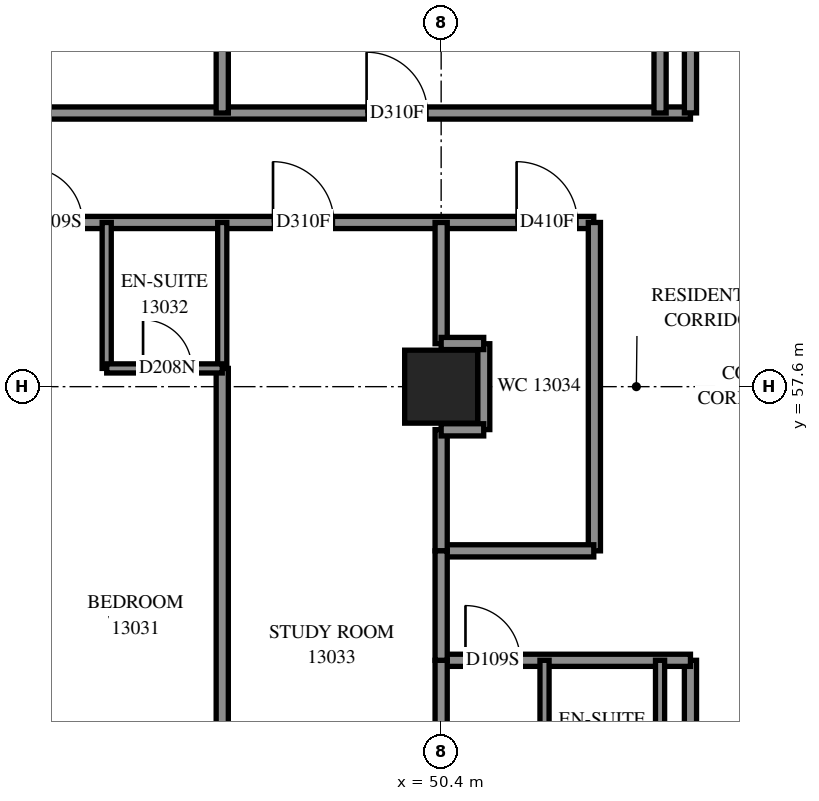
"""IFC4 building model, lengths in metres.
Left out: names, types, materials, properties, quantities, classifications, styles, units other than length and angle.
Written with IfcOpenShell. Run it as: python <this file> out.ifc"""

import sys

from ifc_helpers import new_model, si_unit, direction, frame, frame_2d, origin, origin_2d, place, context, subcontext, project, spatial, rectangle, extrude, element, fill, save


model = new_model("IFC4")
c1 = context("Model", 3, precision=1e-05, world=origin(), true_north=direction((0.0, 1.0)))
c2 = subcontext(c1, "Body", "Model", "MODEL_VIEW")
j1 = project(units=[si_unit("LENGTHUNIT", "METRE"), si_unit("PLANEANGLEUNIT", "RADIAN")], contexts=[c1])
p1 = place(None, origin())
s1 = spatial("IfcSite", under=j1, at=p1, CompositionType="ELEMENT")
p2 = place(p1, origin())
s2 = spatial("IfcBuilding", under=s1, at=p2, CompositionType="ELEMENT")
p3 = place(p2, frame((0.0, 0.0, 50.8)))
s3 = spatial("IfcBuildingStorey", under=s2, at=p3, CompositionType="ELEMENT", Elevation=50.8)
p4 = place(p3, frame((50.4, 57.6, 0.0), z_axis=(0.0, 0.0, 1.0), x_axis=(1.0, 0.0, 0.0)))
e1 = element("IfcColumn", 1, at=p4, inside=s3, PredefinedType="COLUMN", context=c2, shape_type="SweptSolid", body=[
    extrude(rectangle(XDim=1.2, YDim=1.2, at=origin_2d()), origin(), (0.0, 0.0, 1.0), 3.1),
])
p5 = place(p3, frame((28.802, 60.3, 0.0), z_axis=(0.0, 0.0, 1.0), x_axis=(1.0, 0.0, 0.0)))
e2 = element("IfcWall", 2, at=p5, inside=s3, PredefinedType="PARTITIONING", context=c2, shape_type="SweptSolid", body=[
    extrude(rectangle(XDim=24.108, YDim=0.2, at=frame_2d((12.054, 0.0))), origin(), (0.0, 0.0, 1.0), 3.1),
])
p6 = place(p5, frame((11.323, 0.0, 0.0)))
e3 = element("IfcOpeningElement", 3, at=p6, cuts=e2, PredefinedType="OPENING", context=c2, shape_type="SweptSolid", body=[
    extrude(rectangle(XDim=1.0, YDim=2.1, at=frame_2d((0.5, 1.05))), frame((0.0, 0.11, 0.0), z_axis=(0.0, -1.0, 0.0), x_axis=(1.0, 0.0, 0.0)), (0.0, 0.0, 1.0), 0.22),
])
p7 = place(p5, frame((14.798, 0.0, 0.0)))
e4 = element("IfcOpeningElement", 4, at=p7, cuts=e2, PredefinedType="OPENING", context=c2, shape_type="SweptSolid", body=[
    extrude(rectangle(XDim=0.9, YDim=2.1, at=frame_2d((0.45, 1.05))), frame((0.0, 0.11, 0.0), z_axis=(0.0, -1.0, 0.0), x_axis=(1.0, 0.0, 0.0)), (0.0, 0.0, 1.0), 0.22),
])
p8 = place(p5, frame((18.833, 0.0, 0.0)))
e5 = element("IfcOpeningElement", 5, at=p8, cuts=e2, PredefinedType="OPENING", context=c2, shape_type="SweptSolid", body=[
    extrude(rectangle(XDim=1.0, YDim=2.1, at=frame_2d((0.5, 1.05))), frame((0.0, 0.11, 0.0), z_axis=(0.0, -1.0, 0.0), x_axis=(1.0, 0.0, 0.0)), (0.0, 0.0, 1.0), 0.22),
])
p9 = place(p5, frame((22.839, 0.0, 0.0)))
e6 = element("IfcOpeningElement", 6, at=p9, cuts=e2, PredefinedType="OPENING", context=c2, shape_type="SweptSolid", body=[
    extrude(rectangle(XDim=1.0, YDim=2.1, at=frame_2d((0.5, 1.05))), frame((0.0, 0.11, 0.0), z_axis=(0.0, -1.0, 0.0), x_axis=(1.0, 0.0, 0.0)), (0.0, 0.0, 1.0), 0.22),
])
p10 = place(p3, frame((33.3, 62.1, 0.0), z_axis=(0.0, 0.0, 1.0), x_axis=(1.0, 0.0, 0.0)))
e7 = element("IfcWall", 7, at=p10, inside=s3, PredefinedType="PARTITIONING", context=c2, shape_type="SweptSolid", body=[
    extrude(rectangle(XDim=21.2, YDim=0.2, at=frame_2d((10.6, 0.0))), origin(), (0.0, 0.0, 1.0), 3.1),
])
p11 = place(p10, frame((1.395, 0.0, 0.0)))
e8 = element("IfcOpeningElement", 8, at=p11, cuts=e7, PredefinedType="OPENING", context=c2, shape_type="SweptSolid", body=[
    extrude(rectangle(XDim=0.9, YDim=2.1, at=frame_2d((0.45, 1.05))), frame((0.0, 0.11, 0.0), z_axis=(0.0, -1.0, 0.0), x_axis=(1.0, 0.0, 0.0)), (0.0, 0.0, 1.0), 0.22),
])
p12 = place(p10, frame((8.674, 0.0, 0.0)))
e9 = element("IfcOpeningElement", 9, at=p12, cuts=e7, PredefinedType="OPENING", context=c2, shape_type="SweptSolid", body=[
    extrude(rectangle(XDim=1.0, YDim=2.1, at=frame_2d((0.5, 1.05))), frame((0.0, 0.11, 0.0), z_axis=(0.0, -1.0, 0.0), x_axis=(1.0, 0.0, 0.0)), (0.0, 0.0, 1.0), 0.22),
])
p13 = place(p10, frame((15.874, 0.0, 0.0)))
e10 = element("IfcOpeningElement", 10, at=p13, cuts=e7, PredefinedType="OPENING", context=c2, shape_type="SweptSolid", body=[
    extrude(rectangle(XDim=1.0, YDim=2.1, at=frame_2d((0.5, 1.05))), frame((0.0, 0.11, 0.0), z_axis=(0.0, -1.0, 0.0), x_axis=(1.0, 0.0, 0.0)), (0.0, 0.0, 1.0), 0.22),
])
p14 = place(p3, frame((46.8, 62.1, 0.0), z_axis=(0.0, 0.0, 1.0), x_axis=(0.0, 1.0, 0.0)))
e11 = element("IfcWall", 11, at=p14, inside=s3, PredefinedType="PARTITIONING", context=c2, shape_type="SweptSolid", body=[
    extrude(rectangle(XDim=10.664, YDim=0.2, at=frame_2d((5.332, 0.0))), origin(), (0.0, 0.0, 1.0), 3.1),
])
p15 = place(p3, frame((54.0, 62.1, 0.0), z_axis=(0.0, 0.0, 1.0), x_axis=(0.0, 1.0, 0.0)))
e12 = element("IfcWall", 12, at=p15, inside=s3, PredefinedType="PARTITIONING", context=c2, shape_type="SweptSolid", body=[
    extrude(rectangle(XDim=10.609, YDim=0.2, at=frame_2d((5.304, 0.0))), origin(), (0.0, 0.0, 1.0), 3.1),
])
p16 = place(p3, frame((46.8, 49.75, 0.0), z_axis=(0.0, 0.0, 1.0), x_axis=(0.0, 1.0, 0.0)))
e13 = element("IfcWall", 13, at=p16, inside=s3, PredefinedType="PARTITIONING", context=c2, shape_type="SweptSolid", body=[
    extrude(rectangle(XDim=8.15, YDim=0.2, at=frame_2d((4.075, 0.0))), origin(), (0.0, 0.0, 1.0), 3.1),
])
p17 = place(p3, frame((54.5, 47.3, 0.0), z_axis=(0.0, 0.0, 1.0), x_axis=(0.0, 1.0, 0.0)))
e14 = element("IfcWall", 14, at=p17, inside=s3, PredefinedType="PARTITIONING", context=c2, shape_type="SweptSolid", body=[
    extrude(rectangle(XDim=5.8, YDim=0.2, at=frame_2d((2.9, 0.0))), origin(), (0.0, 0.0, 1.0), 3.1),
])
p18 = place(p3, frame((54.5, 62.102, 0.0), z_axis=(0.0, 0.0, 1.0), x_axis=(0.0, 1.0, 0.0)))
e15 = element("IfcWall", 15, at=p18, inside=s3, PredefinedType="PARTITIONING", context=c2, shape_type="SweptSolid", body=[
    extrude(rectangle(XDim=5.798, YDim=0.2, at=frame_2d((2.899, 0.0))), origin(), (0.0, 0.0, 1.0), 3.1),
])
p19 = place(p3, frame((52.92, 54.9, 0.0), z_axis=(0.0, 0.0, 1.0), x_axis=(0.0, 1.0, 0.0)))
e16 = element("IfcWall", 16, at=p19, inside=s3, PredefinedType="PARTITIONING", context=c2, shape_type="SweptSolid", body=[
    extrude(rectangle(XDim=5.4, YDim=0.2, at=frame_2d((2.7, 0.0))), origin(), (0.0, 0.0, 1.0), 3.1),
])
p20 = place(p3, frame((50.4, 53.1, 0.0), z_axis=(0.0, 0.0, 1.0), x_axis=(1.0, 0.0, 0.0)))
e17 = element("IfcWall", 17, at=p20, inside=s3, PredefinedType="PARTITIONING", context=c2, shape_type="SweptSolid", body=[
    extrude(rectangle(XDim=4.1, YDim=0.2, at=frame_2d((2.05, 0.0))), origin(), (0.0, 0.0, 1.0), 3.1),
])
p21 = place(p20, frame((0.4, 0.0, 0.0)))
e18 = element("IfcOpeningElement", 18, at=p21, cuts=e17, PredefinedType="OPENING", context=c2, shape_type="SweptSolid", body=[
    extrude(rectangle(XDim=0.9, YDim=2.1, at=frame_2d((0.45, 1.05))), frame((0.0, 0.11, 0.0), z_axis=(0.0, -1.0, 0.0), x_axis=(1.0, 0.0, 0.0)), (0.0, 0.0, 1.0), 0.22),
])
p22 = place(p3, frame((50.4, 54.9, 0.0), z_axis=(0.0, 0.0, 1.0), x_axis=(1.0, 0.0, 0.0)))
e19 = element("IfcWall", 19, at=p22, inside=s3, PredefinedType="PARTITIONING", context=c2, shape_type="SweptSolid", body=[
    extrude(rectangle(XDim=2.51, YDim=0.2, at=frame_2d((1.255, 0.0))), origin(), (0.0, 0.0, 1.0), 3.1),
])
for number, where, z_axis, x_axis in (
    (20, (44.9, 57.9, 0.0), (0.0, 0.0, 1.0), (0.0, 1.0, 0.0)),
    (21, (46.8, 57.9, 0.0), (0.0, 0.0, 1.0), (0.0, 1.0, 0.0)),
    (22, (52.1, 50.7, 0.0), (0.0, 0.0, 1.0), (0.0, 1.0, 0.0)),
    (23, (54.0, 50.7, 0.0), (0.0, 0.0, 1.0), (0.0, 1.0, 0.0)),
):
    element("IfcWall", number, at=place(p3, frame(where, z_axis=z_axis, x_axis=x_axis)), inside=s3, PredefinedType="PARTITIONING", context=c2, shape_type="SweptSolid", body=[
        extrude(rectangle(XDim=2.4, YDim=0.15, at=frame_2d((1.2, 0.0))), origin(), (0.0, 0.0, 1.0), 3.1),
    ])
p23 = place(p3, frame((50.4, 51.0, 0.0), z_axis=(0.0, 0.0, 1.0), x_axis=(0.0, 1.0, 0.0)))
e24 = element("IfcWall", 24, at=p23, inside=s3, PredefinedType="PARTITIONING", context=c2, shape_type="SweptSolid", body=[
    extrude(rectangle(XDim=2.1, YDim=0.2, at=frame_2d((1.05, 0.0))), origin(), (0.0, 0.0, 1.0), 3.1),
])
for number, where, z_axis, x_axis in (
    (25, (50.4, 54.9, 0.0), (0.0, 0.0, 1.0), (0.0, 1.0, 0.0)),
    (26, (50.4, 58.306, 0.0), (0.0, 0.0, 1.0), (0.0, 1.0, 0.0)),
):
    element("IfcWall", number, at=place(p3, frame(where, z_axis=z_axis, x_axis=x_axis)), inside=s3, PredefinedType="PARTITIONING", context=c2, shape_type="SweptSolid", body=[
        extrude(rectangle(XDim=1.994, YDim=0.2, at=frame_2d((0.997, 0.0))), origin(), (0.0, 0.0, 1.0), 3.1),
    ])
p24 = place(p3, frame((44.9, 57.9, 0.0), z_axis=(0.0, 0.0, 1.0), x_axis=(1.0, 0.0, 0.0)))
e27 = element("IfcWall", 27, at=p24, inside=s3, PredefinedType="PARTITIONING", context=c2, shape_type="SweptSolid", body=[
    extrude(rectangle(XDim=1.9, YDim=0.15, at=frame_2d((0.95, 0.0))), origin(), (0.0, 0.0, 1.0), 3.1),
])
p25 = place(p24, frame((0.598, 0.0, 0.0)))
e28 = element("IfcOpeningElement", 28, at=p25, cuts=e27, PredefinedType="OPENING", context=c2, shape_type="SweptSolid", body=[
    extrude(rectangle(XDim=0.8, YDim=2.1, at=frame_2d((0.4, 1.05))), frame((0.0, 0.085, 0.0), z_axis=(0.0, -1.0, 0.0), x_axis=(1.0, 0.0, 0.0)), (0.0, 0.0, 1.0), 0.17),
])
p26 = place(p3, frame((50.4, 53.1, 0.0), z_axis=(0.0, 0.0, 1.0), x_axis=(0.0, 1.0, 0.0)))
e29 = element("IfcWall", 29, at=p26, inside=s3, PredefinedType="PARTITIONING", context=c2, shape_type="SweptSolid", body=[
    extrude(rectangle(XDim=1.8, YDim=0.2, at=frame_2d((0.9, 0.0))), origin(), (0.0, 0.0, 1.0), 3.1),
])
p27 = place(p3, frame((51.1, 56.894, 0.0), z_axis=(0.0, 0.0, 1.0), x_axis=(0.0, 1.0, 0.0)))
e30 = element("IfcWall", 30, at=p27, inside=s3, PredefinedType="PARTITIONING", context=c2, shape_type="SweptSolid", body=[
    extrude(rectangle(XDim=1.412, YDim=0.2, at=frame_2d((0.706, 0.0))), origin(), (0.0, 0.0, 1.0), 3.1),
])
for number, where, z_axis, x_axis in (
    (31, (50.4, 58.31, 0.0), (0.0, 0.0, 1.0), (1.0, 0.0, 0.0)),
    (32, (50.4, 56.89, 0.0), (0.0, 0.0, 1.0), (1.0, 0.0, 0.0)),
):
    element("IfcWall", number, at=place(p3, frame(where, z_axis=z_axis, x_axis=x_axis)), inside=s3, PredefinedType="PARTITIONING", context=c2, shape_type="SweptSolid", body=[
        extrude(rectangle(XDim=0.7, YDim=0.2, at=frame_2d((0.35, 0.0))), origin(), (0.0, 0.0, 1.0), 3.1),
    ])
p28 = place(p13, origin())
e33 = element("IfcDoor", 33, at=p28, inside=s3, OperationType="SINGLE_SWING_LEFT", PredefinedType="DOOR", context=c2, shape_type="SweptSolid", body=[
    extrude(rectangle(XDim=1.0, YDim=2.1, at=frame_2d((0.5, 1.05))), frame((0.0, 0.025, 0.0), z_axis=(0.0, -1.0, 0.0), x_axis=(1.0, 0.0, 0.0)), (0.0, 0.0, 1.0), 0.05),
])
fill(e10, e33)
p29 = place(p7, origin())
e34 = element("IfcDoor", 34, at=p29, inside=s3, OperationType="SINGLE_SWING_LEFT", PredefinedType="DOOR", context=c2, shape_type="SweptSolid", body=[
    extrude(rectangle(XDim=0.9, YDim=2.1, at=frame_2d((0.45, 1.05))), frame((0.0, 0.025, 0.0), z_axis=(0.0, -1.0, 0.0), x_axis=(1.0, 0.0, 0.0)), (0.0, 0.0, 1.0), 0.05),
])
fill(e4, e34)
p30 = place(p25, origin())
e35 = element("IfcDoor", 35, at=p30, inside=s3, OperationType="SINGLE_SWING_RIGHT", PredefinedType="DOOR", context=c2, shape_type="SweptSolid", body=[
    extrude(rectangle(XDim=0.8, YDim=2.1, at=frame_2d((0.4, 1.05))), frame((0.0, 0.025, 0.0), z_axis=(0.0, -1.0, 0.0), x_axis=(1.0, 0.0, 0.0)), (0.0, 0.0, 1.0), 0.05),
])
fill(e28, e35)
p31 = place(p8, origin())
e36 = element("IfcDoor", 36, at=p31, inside=s3, OperationType="SINGLE_SWING_RIGHT", PredefinedType="DOOR", context=c2, shape_type="SweptSolid", body=[
    extrude(rectangle(XDim=1.0, YDim=2.1, at=frame_2d((0.5, 1.05))), frame((0.0, 0.025, 0.0), z_axis=(0.0, -1.0, 0.0), x_axis=(1.0, 0.0, 0.0)), (0.0, 0.0, 1.0), 0.05),
])
fill(e5, e36)
p32 = place(p9, origin())
e37 = element("IfcDoor", 37, at=p32, inside=s3, OperationType="SINGLE_SWING_LEFT", PredefinedType="DOOR", context=c2, shape_type="SweptSolid", body=[
    extrude(rectangle(XDim=1.0, YDim=2.1, at=frame_2d((0.5, 1.05))), frame((0.0, 0.025, 0.0), z_axis=(0.0, -1.0, 0.0), x_axis=(1.0, 0.0, 0.0)), (0.0, 0.0, 1.0), 0.05),
])
fill(e6, e37)
p33 = place(p21, origin())
e38 = element("IfcDoor", 38, at=p33, inside=s3, OperationType="SINGLE_SWING_LEFT", PredefinedType="DOOR", context=c2, shape_type="SweptSolid", body=[
    extrude(rectangle(XDim=0.9, YDim=2.1, at=frame_2d((0.45, 1.05))), frame((0.0, 0.025, 0.0), z_axis=(0.0, -1.0, 0.0), x_axis=(1.0, 0.0, 0.0)), (0.0, 0.0, 1.0), 0.05),
])
fill(e18, e38)
save(model, sys.argv[1])
